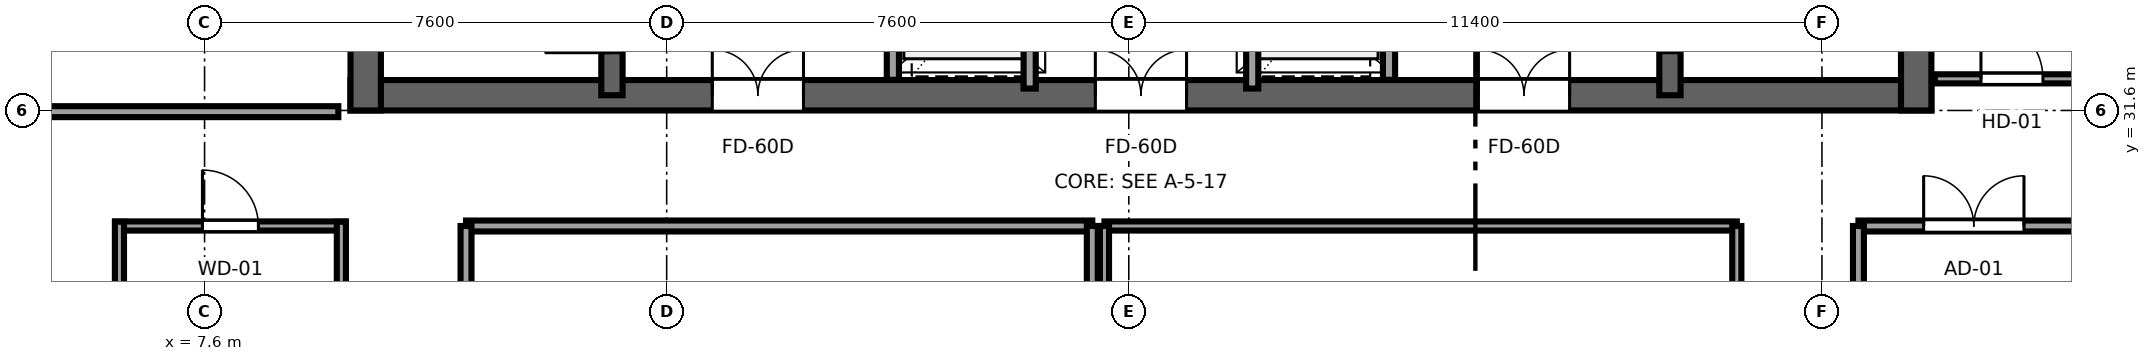
"""IFC4 building model, lengths in metres.
Left out: names, types, materials, properties, quantities, classifications, styles, units other than length and angle.
Written with IfcOpenShell. Run it as: python <this file> out.ifc"""

import sys

from ifc_helpers import new_model, si_unit, direction, frame, frame_2d, origin, place, context, subcontext, project, spatial, rectangle, extrude, source, transform, mapped, element, fill, save


model = new_model("IFC4")
c1 = context("Model", 3, precision=1e-05, world=origin(), true_north=direction((0.0, 1.0)))
c2 = subcontext(c1, "Body", "Model", "MODEL_VIEW")
j1 = project(units=[si_unit("LENGTHUNIT", "METRE"), si_unit("PLANEANGLEUNIT", "RADIAN")], contexts=[c1])
p1 = place(None, origin())
s1 = spatial("IfcSite", under=j1, at=p1, CompositionType="ELEMENT")
p2 = place(p1, origin())
s2 = spatial("IfcBuilding", under=s1, at=p2, CompositionType="ELEMENT")
p3 = place(p2, frame((0.0, 0.0, 248.75)))
s3 = spatial("IfcBuildingStorey", under=s2, at=p3, CompositionType="ELEMENT", Elevation=248.75)
p4 = place(p3, frame((10.0, 31.85, 0.0), z_axis=(0.0, 0.0, 1.0), x_axis=(1.0, 0.0, 0.0)))
e1 = element("IfcWall", 1, at=p4, inside=s3, PredefinedType="SHEAR", context=c2, shape_type="SweptSolid", body=[
    extrude(rectangle(XDim=26.0, YDim=0.5, at=frame_2d((13.0, 0.0))), origin(), (0.0, 0.0, 1.0), 3.55),
])
p5 = place(p4, frame((7.45, 0.0, 0.0), z_axis=(0.0, 0.0, 1.0), x_axis=(-1.0, 0.0, 0.0)))
e2 = element("IfcOpeningElement", 2, at=p5, cuts=e1, PredefinedType="OPENING", context=c2, shape_type="SweptSolid", body=[
    extrude(rectangle(XDim=1.5, YDim=2.04, at=frame_2d((0.75, 1.02))), frame((0.0, 0.26, 0.0), z_axis=(0.0, -1.0, 0.0), x_axis=(1.0, 0.0, 0.0)), (0.0, 0.0, 1.0), 0.52),
])
p6 = place(p4, frame((13.75, 0.0, 0.0), z_axis=(0.0, 0.0, 1.0), x_axis=(-1.0, 0.0, 0.0)))
e3 = element("IfcOpeningElement", 3, at=p6, cuts=e1, PredefinedType="OPENING", context=c2, shape_type="SweptSolid", body=[
    extrude(rectangle(XDim=1.5, YDim=2.04, at=frame_2d((0.75, 1.02))), frame((0.0, 0.26, 0.0), z_axis=(0.0, -1.0, 0.0), x_axis=(1.0, 0.0, 0.0)), (0.0, 0.0, 1.0), 0.52),
])
p7 = place(p4, frame((20.05, 0.0, 0.0), z_axis=(0.0, 0.0, 1.0), x_axis=(-1.0, 0.0, 0.0)))
e4 = element("IfcOpeningElement", 4, at=p7, cuts=e1, PredefinedType="OPENING", context=c2, shape_type="SweptSolid", body=[
    extrude(rectangle(XDim=1.5, YDim=2.04, at=frame_2d((0.75, 1.02))), frame((0.0, 0.26, 0.0), z_axis=(0.0, -1.0, 0.0), x_axis=(1.0, 0.0, 0.0)), (0.0, 0.0, 1.0), 0.52),
])
for number, where, z_axis, x_axis in (
    (5, (10.25, 31.6, 0.0), (0.0, 0.0, 1.0), (0.0, 1.0, 0.0)),
    (6, (35.75, 31.6, 0.0), (0.0, 0.0, 1.0), (0.0, 1.0, 0.0)),
):
    element("IfcWall", number, at=place(p3, frame(where, z_axis=z_axis, x_axis=x_axis)), inside=s3, PredefinedType="SHEAR", context=c2, shape_type="SweptSolid", body=[
        extrude(rectangle(XDim=13.6, YDim=0.5, at=frame_2d((6.8, 0.0))), origin(), (0.0, 0.0, 1.0), 3.55),
    ])
p8 = place(p3, frame((14.3, 31.85, 0.0), z_axis=(0.0, 0.0, 1.0), x_axis=(0.0, 1.0, 0.0)))
e7 = element("IfcWall", 7, at=p8, inside=s3, PredefinedType="SHEAR", context=c2, shape_type="SweptSolid", body=[
    extrude(rectangle(XDim=13.1, YDim=0.35, at=frame_2d((6.55, 0.0))), origin(), (0.0, 0.0, 1.0), 3.55),
])
p9 = place(p8, frame((0.7, 0.0, 0.0)))
e8 = element("IfcOpeningElement", 8, at=p9, cuts=e7, PredefinedType="OPENING", context=c2, shape_type="SweptSolid", body=[
    extrude(rectangle(XDim=1.1, YDim=2.12, at=frame_2d((0.55, 1.06))), frame((0.0, 0.185, 0.0), z_axis=(0.0, -1.0, 0.0), x_axis=(1.0, 0.0, 0.0)), (0.0, 0.0, 1.0), 0.37),
])
p10 = place(p3, frame((31.7, 31.85, 0.0), z_axis=(0.0, 0.0, 1.0), x_axis=(0.0, 1.0, 0.0)))
e9 = element("IfcWall", 9, at=p10, inside=s3, PredefinedType="SHEAR", context=c2, shape_type="SweptSolid", body=[
    extrude(rectangle(XDim=13.1, YDim=0.35, at=frame_2d((6.55, 0.0))), origin(), (0.0, 0.0, 1.0), 3.55),
])
p11 = place(p10, frame((1.8, 0.0, 0.0), z_axis=(0.0, 0.0, 1.0), x_axis=(-1.0, 0.0, 0.0)))
e10 = element("IfcOpeningElement", 10, at=p11, cuts=e9, PredefinedType="OPENING", context=c2, shape_type="SweptSolid", body=[
    extrude(rectangle(XDim=1.1, YDim=2.12, at=frame_2d((0.55, 1.06))), frame((0.0, 0.185, 0.0), z_axis=(0.0, -1.0, 0.0), x_axis=(1.0, 0.0, 0.0)), (0.0, 0.0, 1.0), 0.37),
])
for number, where, z_axis, x_axis in (
    (11, (18.92, 32.104, 0.0), (0.0, 0.0, 1.0), (0.0, 1.0, 0.0)),
    (12, (27.08, 32.104, 0.0), (0.0, 0.0, 1.0), (0.0, 1.0, 0.0)),
):
    element("IfcWall", number, at=place(p3, frame(where, z_axis=z_axis, x_axis=x_axis)), inside=s3, PredefinedType="SOLIDWALL", context=c2, shape_type="SweptSolid", body=[
        extrude(rectangle(XDim=4.046, YDim=0.2, at=frame_2d((2.023, 0.0))), origin(), (0.0, 0.0, 1.0), 3.37),
    ])
p12 = place(p3, frame((21.17, 31.96, 0.0), z_axis=(0.0, 0.0, 1.0), x_axis=(0.0, 1.0, 0.0)))
e13 = element("IfcWall", 13, at=p12, inside=s3, PredefinedType="SOLIDWALL", context=c2, shape_type="SweptSolid", body=[
    extrude(rectangle(XDim=5.08, YDim=0.2, at=frame_2d((2.54, 0.0))), origin(), (0.0, 0.0, 1.0), 3.37),
])
p13 = place(p12, frame((0.74, 0.0, 0.0)))
e14 = element("IfcOpeningElement", 14, at=p13, cuts=e13, PredefinedType="OPENING", context=c2, shape_type="SweptSolid", body=[
    extrude(rectangle(XDim=1.1, YDim=2.12, at=frame_2d((0.55, 1.06))), frame((0.0, 0.11, 0.0), z_axis=(0.0, -1.0, 0.0), x_axis=(1.0, 0.0, 0.0)), (0.0, 0.0, 1.0), 0.22),
])
p14 = place(p12, frame((3.24, 0.0, 0.0)))
e15 = element("IfcOpeningElement", 15, at=p14, cuts=e13, PredefinedType="OPENING", context=c2, shape_type="SweptSolid", body=[
    extrude(rectangle(XDim=1.1, YDim=2.12, at=frame_2d((0.55, 1.06))), frame((0.0, 0.11, 0.0), z_axis=(0.0, -1.0, 0.0), x_axis=(1.0, 0.0, 0.0)), (0.0, 0.0, 1.0), 0.22),
])
p15 = place(p3, frame((24.83, 31.96, 0.0), z_axis=(0.0, 0.0, 1.0), x_axis=(0.0, 1.0, 0.0)))
e16 = element("IfcWall", 16, at=p15, inside=s3, PredefinedType="SOLIDWALL", context=c2, shape_type="SweptSolid", body=[
    extrude(rectangle(XDim=5.08, YDim=0.2, at=frame_2d((2.54, 0.0))), origin(), (0.0, 0.0, 1.0), 3.37),
])
p16 = place(p15, frame((0.74, 0.0, 0.0)))
e17 = element("IfcOpeningElement", 17, at=p16, cuts=e16, PredefinedType="OPENING", context=c2, shape_type="SweptSolid", body=[
    extrude(rectangle(XDim=1.1, YDim=2.12, at=frame_2d((0.55, 1.06))), frame((0.0, 0.11, 0.0), z_axis=(0.0, -1.0, 0.0), x_axis=(1.0, 0.0, 0.0)), (0.0, 0.0, 1.0), 0.22),
])
p17 = place(p15, frame((3.24, 0.0, 0.0)))
e18 = element("IfcOpeningElement", 18, at=p17, cuts=e16, PredefinedType="OPENING", context=c2, shape_type="SweptSolid", body=[
    extrude(rectangle(XDim=1.1, YDim=2.12, at=frame_2d((0.55, 1.06))), frame((0.0, 0.11, 0.0), z_axis=(0.0, -1.0, 0.0), x_axis=(1.0, 0.0, 0.0)), (0.0, 0.0, 1.0), 0.22),
])
p18 = place(p3, frame((11.9, 29.7, 0.0), z_axis=(0.0, 0.0, 1.0), x_axis=(1.0, 0.0, 0.0)))
e19 = element("IfcWall", 19, at=p18, inside=s3, PredefinedType="PARTITIONING", context=c2, shape_type="SweptSolid", body=[
    extrude(rectangle(XDim=10.3, YDim=0.18, at=frame_2d((5.15, 0.0))), origin(), (0.0, 0.0, 1.0), 3.37),
])
p19 = place(p3, frame((11.9, 21.55, 0.0), z_axis=(0.0, 0.0, 1.0), x_axis=(0.0, 1.0, 0.0)))
e20 = element("IfcWall", 20, at=p19, inside=s3, PredefinedType="PARTITIONING", context=c2, shape_type="SweptSolid", body=[
    extrude(rectangle(XDim=8.15, YDim=0.18, at=frame_2d((4.075, 0.0))), origin(), (0.0, 0.0, 1.0), 3.37),
])
p20 = place(p3, frame((22.2, 21.55, 0.0), z_axis=(0.0, 0.0, 1.0), x_axis=(0.0, 1.0, 0.0)))
e21 = element("IfcWall", 21, at=p20, inside=s3, PredefinedType="PARTITIONING", context=c2, shape_type="SweptSolid", body=[
    extrude(rectangle(XDim=8.15, YDim=0.18, at=frame_2d((4.075, 0.0))), origin(), (0.0, 0.0, 1.0), 2.827),
])
p21 = place(p3, frame((22.4, 29.7, 0.0), z_axis=(0.0, 0.0, 1.0), x_axis=(1.0, 0.0, 0.0)))
e22 = element("IfcWall", 22, at=p21, inside=s3, PredefinedType="PARTITIONING", context=c2, shape_type="SweptSolid", body=[
    extrude(rectangle(XDim=10.4, YDim=0.15, at=frame_2d((5.2, 0.0))), origin(), (0.0, 0.0, 1.0), 3.37),
])
p22 = place(p3, frame((22.4, 21.55, 0.0), z_axis=(0.0, 0.0, 1.0), x_axis=(0.0, 1.0, 0.0)))
e23 = element("IfcWall", 23, at=p22, inside=s3, PredefinedType="PARTITIONING", context=c2, shape_type="SweptSolid", body=[
    extrude(rectangle(XDim=8.15, YDim=0.15, at=frame_2d((4.075, 0.0))), origin(), (0.0, 0.0, 1.0), 3.37),
])
p23 = place(p3, frame((32.8, 21.55, 0.0), z_axis=(0.0, 0.0, 1.0), x_axis=(0.0, 1.0, 0.0)))
e24 = element("IfcWall", 24, at=p23, inside=s3, PredefinedType="PARTITIONING", context=c2, shape_type="SweptSolid", body=[
    extrude(rectangle(XDim=8.15, YDim=0.15, at=frame_2d((4.075, 0.0))), origin(), (0.0, 0.0, 1.0), 2.827),
])
p24 = place(p3, frame((6.13, 29.7, 0.0), z_axis=(0.0, 0.0, 1.0), x_axis=(1.0, 0.0, 0.0)))
e25 = element("IfcWall", 25, at=p24, inside=s3, PredefinedType="PARTITIONING", context=c2, shape_type="SweptSolid", body=[
    extrude(rectangle(XDim=3.79, YDim=0.15, at=frame_2d((1.895, 0.0))), origin(), (0.0, 0.0, 1.0), 3.37),
])
p25 = place(p24, frame((1.435, 0.0, 0.0)))
e26 = element("IfcOpeningElement", 26, at=p25, cuts=e25, PredefinedType="OPENING", context=c2, shape_type="SweptSolid", body=[
    extrude(rectangle(XDim=0.92, YDim=2.01, at=frame_2d((0.46, 1.005))), frame((0.0, 0.085, 0.0), z_axis=(0.0, -1.0, 0.0), x_axis=(1.0, 0.0, 0.0)), (0.0, 0.0, 1.0), 0.17),
])
for number, where, z_axis, x_axis in (
    (27, (6.2, 26.43, 0.0), (0.0, 0.0, 1.0), (0.0, 1.0, 0.0)),
    (28, (9.85, 26.43, 0.0), (0.0, 0.0, 1.0), (0.0, 1.0, 0.0)),
):
    element("IfcWall", number, at=place(p3, frame(where, z_axis=z_axis, x_axis=x_axis)), inside=s3, PredefinedType="PARTITIONING", context=c2, shape_type="SweptSolid", body=[
        extrude(rectangle(XDim=3.34, YDim=0.15, at=frame_2d((1.67, 0.0))), origin(), (0.0, 0.0, 1.0), 3.37),
    ])
p26 = place(p3, frame((3.005, 31.58, 0.0), z_axis=(0.0, 0.0, 1.0), x_axis=(1.0, 0.0, 0.0)))
e29 = element("IfcWall", 29, at=p26, inside=s3, PredefinedType="PARTITIONING", context=c2, shape_type="SweptSolid", body=[
    extrude(rectangle(XDim=6.795, YDim=0.18, at=frame_2d((3.397, 0.0))), origin(), (0.0, 0.0, 1.0), 3.37),
])
p27 = place(p26, frame((0.285, 0.0, 0.0)))
e30 = element("IfcOpeningElement", 30, at=p27, cuts=e29, PredefinedType="OPENING", context=c2, shape_type="SweptSolid", body=[
    extrude(rectangle(XDim=0.98, YDim=2.12, at=frame_2d((0.49, 1.06))), frame((0.0, 0.1, 0.0), z_axis=(0.0, -1.0, 0.0), x_axis=(1.0, 0.0, 0.0)), (0.0, 0.0, 1.0), 0.2),
])
p28 = place(p3, frame((36.055, 32.12, 0.0), z_axis=(0.0, 0.0, 1.0), x_axis=(1.0, 0.0, 0.0)))
e31 = element("IfcWall", 31, at=p28, inside=s3, PredefinedType="PARTITIONING", context=c2, shape_type="SweptSolid", body=[
    extrude(rectangle(XDim=2.54, YDim=0.15, at=frame_2d((1.27, 0.0))), origin(), (0.0, 0.0, 1.0), 3.37),
])
p29 = place(p28, frame((0.76, 0.0, 0.0)))
e32 = element("IfcOpeningElement", 32, at=p29, cuts=e31, PredefinedType="OPENING", context=c2, shape_type="SweptSolid", body=[
    extrude(rectangle(XDim=1.02, YDim=2.03, at=frame_2d((0.51, 1.015))), frame((0.0, 0.085, 0.0), z_axis=(0.0, -1.0, 0.0), x_axis=(1.0, 0.0, 0.0)), (0.0, 0.0, 1.0), 0.17),
])
p30 = place(p3, frame((34.8, 29.7, 0.0), z_axis=(0.0, 0.0, 1.0), x_axis=(1.0, 0.0, 0.0)))
e33 = element("IfcWall", 33, at=p30, inside=s3, PredefinedType="PARTITIONING", context=c2, shape_type="SweptSolid", body=[
    extrude(rectangle(XDim=3.795, YDim=0.18, at=frame_2d((1.897, 0.0))), origin(), (0.0, 0.0, 1.0), 3.37),
])
p31 = place(p30, frame((1.073, 0.0, 0.0)))
e34 = element("IfcOpeningElement", 34, at=p31, cuts=e33, PredefinedType="OPENING", context=c2, shape_type="SweptSolid", body=[
    extrude(rectangle(XDim=1.65, YDim=2.15, at=frame_2d((0.825, 1.075))), frame((0.0, 0.1, 0.0), z_axis=(0.0, -1.0, 0.0), x_axis=(1.0, 0.0, 0.0)), (0.0, 0.0, 1.0), 0.2),
])
p32 = place(p3, frame((34.8, 21.9, 0.0), z_axis=(0.0, 0.0, 1.0), x_axis=(0.0, 1.0, 0.0)))
e35 = element("IfcWall", 35, at=p32, inside=s3, PredefinedType="PARTITIONING", context=c2, shape_type="SweptSolid", body=[
    extrude(rectangle(XDim=7.8, YDim=0.18, at=frame_2d((3.9, 0.0))), origin(), (0.0, 0.0, 1.0), 2.827),
])
m1 = source(origin(), c2, "Body", "SweptSolid", [
    extrude(rectangle(XDim=1.1, YDim=2.12, at=frame_2d((0.55, 1.06))), frame((0.0, 0.025, 0.0), z_axis=(0.0, -1.0, 0.0), x_axis=(1.0, 0.0, 0.0)), (0.0, 0.0, 1.0), 0.05),
])
p33 = place(p9, origin())
e36 = element("IfcDoor", 36, at=p33, inside=s3, OperationType="SINGLE_SWING_LEFT", PredefinedType="DOOR", context=c2, shape_type="MappedRepresentation", body=[
    mapped(m1, transform((0.0, 0.0, 0.0), x_axis=(1.0, 0.0, 0.0), y_axis=(0.0, 1.0, 0.0), z_axis=(0.0, 0.0, 1.0), scale=1.0)),
])
fill(e8, e36)
p34 = place(p11, origin())
e37 = element("IfcDoor", 37, at=p34, inside=s3, OperationType="SINGLE_SWING_RIGHT", PredefinedType="DOOR", context=c2, shape_type="MappedRepresentation", body=[
    mapped(m1, transform((0.0, 0.0, 0.0), x_axis=(1.0, 0.0, 0.0), y_axis=(0.0, 1.0, 0.0), z_axis=(0.0, 0.0, 1.0), scale=1.0)),
])
fill(e10, e37)
m2 = source(origin(), c2, "Body", "SweptSolid", [
    extrude(rectangle(XDim=1.5, YDim=2.04, at=frame_2d((0.75, 1.02))), frame((0.0, 0.025, 0.0), z_axis=(0.0, -1.0, 0.0), x_axis=(1.0, 0.0, 0.0)), (0.0, 0.0, 1.0), 0.05),
])
p35 = place(p5, origin())
e38 = element("IfcDoor", 38, at=p35, inside=s3, OperationType="DOUBLE_DOOR_SINGLE_SWING", PredefinedType="DOOR", context=c2, shape_type="MappedRepresentation", body=[
    mapped(m2, transform((0.0, 0.0, 0.0), x_axis=(1.0, 0.0, 0.0), y_axis=(0.0, 1.0, 0.0), z_axis=(0.0, 0.0, 1.0), scale=1.0)),
])
fill(e2, e38)
p36 = place(p6, origin())
e39 = element("IfcDoor", 39, at=p36, inside=s3, OperationType="DOUBLE_DOOR_SINGLE_SWING", PredefinedType="DOOR", context=c2, shape_type="MappedRepresentation", body=[
    mapped(m2, transform((0.0, 0.0, 0.0), x_axis=(1.0, 0.0, 0.0), y_axis=(0.0, 1.0, 0.0), z_axis=(0.0, 0.0, 1.0), scale=1.0)),
])
fill(e3, e39)
p37 = place(p7, origin())
e40 = element("IfcDoor", 40, at=p37, inside=s3, OperationType="DOUBLE_DOOR_SINGLE_SWING", PredefinedType="DOOR", context=c2, shape_type="MappedRepresentation", body=[
    mapped(m2, transform((0.0, 0.0, 0.0), x_axis=(1.0, 0.0, 0.0), y_axis=(0.0, 1.0, 0.0), z_axis=(0.0, 0.0, 1.0), scale=1.0)),
])
fill(e4, e40)
m3 = source(origin(), c2, "Body", "SweptSolid", [
    extrude(rectangle(XDim=0.92, YDim=2.01, at=frame_2d((0.46, 1.005))), frame((0.0, 0.025, 0.0), z_axis=(0.0, -1.0, 0.0), x_axis=(1.0, 0.0, 0.0)), (0.0, 0.0, 1.0), 0.05),
])
p38 = place(p25, origin())
e41 = element("IfcDoor", 41, at=p38, inside=s3, OperationType="SINGLE_SWING_LEFT", PredefinedType="DOOR", context=c2, shape_type="MappedRepresentation", body=[
    mapped(m3, transform((0.0, 0.0, 0.0), x_axis=(1.0, 0.0, 0.0), y_axis=(0.0, 1.0, 0.0), z_axis=(0.0, 0.0, 1.0), scale=1.0)),
])
fill(e26, e41)
m4 = source(origin(), c2, "Body", "SweptSolid", [
    extrude(rectangle(XDim=1.02, YDim=2.03, at=frame_2d((0.51, 1.015))), frame((0.0, 0.025, 0.0), z_axis=(0.0, -1.0, 0.0), x_axis=(1.0, 0.0, 0.0)), (0.0, 0.0, 1.0), 0.05),
])
p39 = place(p29, origin())
e42 = element("IfcDoor", 42, at=p39, inside=s3, OperationType="SINGLE_SWING_LEFT", PredefinedType="DOOR", context=c2, shape_type="MappedRepresentation", body=[
    mapped(m4, transform((0.0, 0.0, 0.0), x_axis=(1.0, 0.0, 0.0), y_axis=(0.0, 1.0, 0.0), z_axis=(0.0, 0.0, 1.0), scale=1.0)),
])
fill(e32, e42)
m5 = source(origin(), c2, "Body", "SweptSolid", [
    extrude(rectangle(XDim=1.65, YDim=2.15, at=frame_2d((0.825, 1.075))), frame((0.0, 0.025, 0.0), z_axis=(0.0, -1.0, 0.0), x_axis=(1.0, 0.0, 0.0)), (0.0, 0.0, 1.0), 0.05),
])
p40 = place(p31, origin())
e43 = element("IfcDoor", 43, at=p40, inside=s3, OperationType="DOUBLE_DOOR_SINGLE_SWING", PredefinedType="DOOR", context=c2, shape_type="MappedRepresentation", body=[
    mapped(m5, transform((0.0, 0.0, 0.0), x_axis=(1.0, 0.0, 0.0), y_axis=(0.0, 1.0, 0.0), z_axis=(0.0, 0.0, 1.0), scale=1.0)),
])
fill(e34, e43)
save(model, sys.argv[1])
